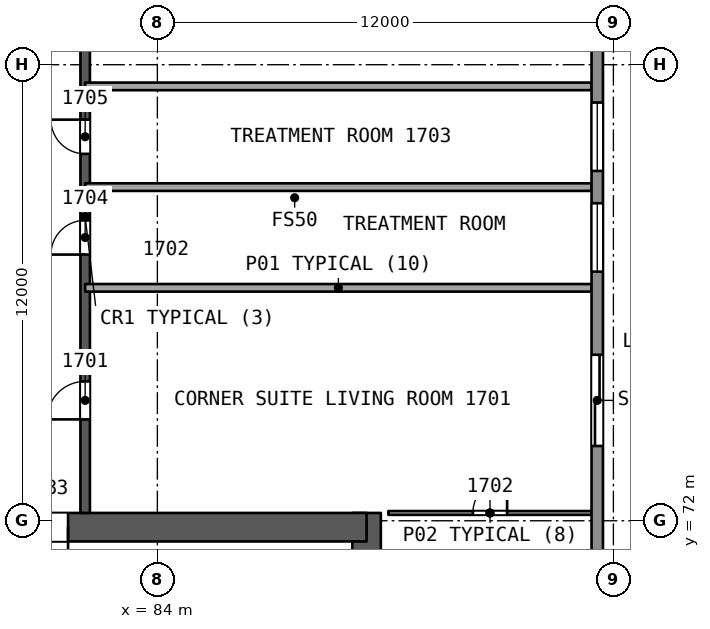
"""IFC4 building model, lengths in metres.
Left out: names, types, materials, properties, quantities, classifications, styles, units other than length and angle.
Written with IfcOpenShell. Run it as: python <this file> out.ifc"""

import sys

from ifc_helpers import new_model, si_unit, direction, frame, frame_2d, origin, place, context, subcontext, project, spatial, rectangle, extrude, element, fill, save


model = new_model("IFC4")
c1 = context("Model", 3, precision=1e-05, world=origin(), true_north=direction((0.0, 1.0)))
c2 = subcontext(c1, "Body", "Model", "MODEL_VIEW")
j1 = project(units=[si_unit("LENGTHUNIT", "METRE"), si_unit("PLANEANGLEUNIT", "RADIAN")], contexts=[c1])
p1 = place(None, origin())
s1 = spatial("IfcSite", under=j1, at=p1, CompositionType="ELEMENT")
p2 = place(p1, origin())
s2 = spatial("IfcBuilding", under=s1, at=p2, CompositionType="ELEMENT")
p3 = place(p2, frame((0.0, 0.0, 75.8)))
s3 = spatial("IfcBuildingStorey", under=s2, at=p3, CompositionType="ELEMENT", Elevation=75.8)
p4 = place(p3, frame((89.505, 58.089, 0.0), z_axis=(0.0, 0.0, 1.0), x_axis=(0.0, 1.0, 0.0)))
e1 = element("IfcWall", 1, at=p4, inside=s3, PredefinedType="SHEAR", context=c2, shape_type="SweptSolid", body=[
    extrude(rectangle(XDim=14.117, YDim=0.75, at=frame_2d((7.059, 0.0))), origin(), (0.0, 0.0, 1.0), 3.7),
])
p5 = place(p3, frame((89.505, 71.831, 0.0), z_axis=(0.0, 0.0, 1.0), x_axis=(-1.0, 0.0, 0.0)))
e2 = element("IfcWall", 2, at=p5, inside=s3, PredefinedType="SHEAR", context=c2, shape_type="SweptSolid", body=[
    extrude(rectangle(XDim=10.005, YDim=0.75, at=frame_2d((5.002, 0.0))), origin(), (0.0, 0.0, 1.0), 3.7),
])
p6 = place(p5, frame((7.855, 0.0, 0.0)))
e3 = element("IfcOpeningElement", 3, at=p6, cuts=e2, PredefinedType="OPENING", context=c2, shape_type="SweptSolid", body=[
    extrude(rectangle(XDim=1.2, YDim=2.1, at=frame_2d((0.6, 1.05))), frame((0.0, 0.385, 0.0), z_axis=(0.0, -1.0, 0.0), x_axis=(1.0, 0.0, 0.0)), (0.0, 0.0, 1.0), 0.771),
])
p7 = place(p3, frame((82.1, 72.206, 0.0), z_axis=(0.0, 0.0, 1.0), x_axis=(0.0, 1.0, 0.0)))
e4 = element("IfcWall", 4, at=p7, inside=s3, PredefinedType="SHEAR", context=c2, shape_type="SweptSolid", body=[
    extrude(rectangle(XDim=15.588, YDim=0.25, at=frame_2d((7.794, 0.0))), origin(), (0.0, 0.0, 1.0), 3.2),
])
p8 = place(p7, frame((2.462, 0.0, 0.0)))
e5 = element("IfcOpeningElement", 5, at=p8, cuts=e4, PredefinedType="OPENING", context=c2, shape_type="SweptSolid", body=[
    extrude(rectangle(XDim=1.0, YDim=2.1, at=frame_2d((0.5, 1.05))), frame((0.0, 0.135, 0.0), z_axis=(0.0, -1.0, 0.0), x_axis=(1.0, 0.0, 0.0)), (0.0, 0.0, 1.0), 0.271),
])
p9 = place(p7, frame((6.799, 0.0, 0.0)))
e6 = element("IfcOpeningElement", 6, at=p9, cuts=e4, PredefinedType="OPENING", context=c2, shape_type="SweptSolid", body=[
    extrude(rectangle(XDim=0.9, YDim=2.1, at=frame_2d((0.45, 1.05))), frame((0.0, 0.135, 0.0), z_axis=(0.0, -1.0, 0.0), x_axis=(1.0, 0.0, 0.0)), (0.0, 0.0, 1.0), 0.271),
])
p10 = place(p7, frame((9.449, 0.0, 0.0)))
e7 = element("IfcOpeningElement", 7, at=p10, cuts=e4, PredefinedType="OPENING", context=c2, shape_type="SweptSolid", body=[
    extrude(rectangle(XDim=0.9, YDim=2.1, at=frame_2d((0.45, 1.05))), frame((0.0, 0.135, 0.0), z_axis=(0.0, -1.0, 0.0), x_axis=(1.0, 0.0, 0.0)), (0.0, 0.0, 1.0), 0.271),
])
p11 = place(p7, frame((12.906, 0.0, 0.0)))
e8 = element("IfcOpeningElement", 8, at=p11, cuts=e4, PredefinedType="OPENING", context=c2, shape_type="SweptSolid", body=[
    extrude(rectangle(XDim=1.0, YDim=2.1, at=frame_2d((0.5, 1.05))), frame((0.0, 0.135, 0.0), z_axis=(0.0, -1.0, 0.0), x_axis=(1.0, 0.0, 0.0)), (0.0, 0.0, 1.0), 0.271),
])
p12 = place(p3, frame((90.079, 72.206, 0.0), z_axis=(0.0, 0.0, 1.0), x_axis=(1.0, 0.0, 0.0)))
e9 = element("IfcWall", 9, at=p12, inside=s3, PredefinedType="PARTITIONING", context=c2, shape_type="SweptSolid", body=[
    extrude(rectangle(XDim=5.347, YDim=0.1, at=frame_2d((2.674, 0.0))), origin(), (0.0, 0.0, 1.0), 3.2),
])
p13 = place(p12, frame((2.224, 0.0, 0.0)))
e10 = element("IfcOpeningElement", 10, at=p13, cuts=e9, PredefinedType="OPENING", context=c2, shape_type="SweptSolid", body=[
    extrude(rectangle(XDim=0.9, YDim=2.1, at=frame_2d((0.45, 1.05))), frame((0.0, 0.061, 0.0), z_axis=(0.0, -1.0, 0.0), x_axis=(1.0, 0.0, 0.0)), (0.0, 0.0, 1.0), 0.121),
])
for number, where, z_axis, x_axis in (
    (11, (95.426, 78.129, 0.0), (0.0, 0.0, 1.0), (-1.0, 0.0, 0.0)),
    (12, (95.426, 80.78, 0.0), (0.0, 0.0, 1.0), (-1.0, 0.0, 0.0)),
    (13, (95.426, 83.429, 0.0), (0.0, 0.0, 1.0), (-1.0, 0.0, 0.0)),
):
    element("IfcWall", number, at=place(p3, frame(where, z_axis=z_axis, x_axis=x_axis)), inside=s3, PredefinedType="PARTITIONING", context=c2, shape_type="SweptSolid", body=[
        extrude(rectangle(XDim=13.326, YDim=0.2, at=frame_2d((6.663, 0.0))), origin(), (0.0, 0.0, 1.0), 3.2),
    ])
p14 = place(p3, frame((95.575, 109.583, 0.0), z_axis=(0.0, 0.0, 1.0), x_axis=(0.0, -1.0, 0.0)))
e14 = element("IfcWall", 14, at=p14, inside=s3, PredefinedType="SOLIDWALL", context=c2, shape_type="SweptSolid", body=[
    extrude(rectangle(XDim=59.167, YDim=0.3, at=frame_2d((29.583, 0.0))), origin(), (0.0, 0.0, 1.0), 3.2),
])
p15 = place(p14, frame((33.216, 0.0, 0.0)))
e15 = element("IfcOpeningElement", 15, at=p15, cuts=e14, PredefinedType="OPENING", context=c2, shape_type="SweptSolid", body=[
    extrude(rectangle(XDim=2.4, YDim=2.4, at=frame_2d((1.2, 1.2))), frame((0.0, 0.161, 0.0), z_axis=(0.0, -1.0, 0.0), x_axis=(1.0, 0.0, 0.0)), (0.0, 0.0, 1.0), 0.321),
])
p16 = place(p14, frame((45.903, 0.0, 0.0)))
e16 = element("IfcOpeningElement", 16, at=p16, cuts=e14, PredefinedType="OPENING", context=c2, shape_type="SweptSolid", body=[
    extrude(rectangle(XDim=2.4, YDim=2.4, at=frame_2d((1.2, 1.2))), frame((0.0, 0.161, 0.0), z_axis=(0.0, -1.0, 0.0), x_axis=(1.0, 0.0, 0.0)), (0.0, 0.0, 1.0), 0.321),
])
p17 = place(p14, frame((22.771, 0.0, 0.0)))
e17 = element("IfcOpeningElement", 17, at=p17, cuts=e14, PredefinedType="OPENING", context=c2, shape_type="SweptSolid", body=[
    extrude(rectangle(XDim=2.4, YDim=2.4, at=frame_2d((1.2, 1.2))), frame((0.0, 0.161, 0.0), z_axis=(0.0, -1.0, 0.0), x_axis=(1.0, 0.0, 0.0)), (0.0, 0.0, 1.0), 0.321),
])
p18 = place(p14, frame((10.88, 0.0, 0.0)))
e18 = element("IfcOpeningElement", 18, at=p18, cuts=e14, PredefinedType="OPENING", context=c2, shape_type="SweptSolid", body=[
    extrude(rectangle(XDim=2.4, YDim=2.4, at=frame_2d((1.2, 1.2))), frame((0.0, 0.161, 0.0), z_axis=(0.0, -1.0, 0.0), x_axis=(1.0, 0.0, 0.0)), (0.0, 0.0, 1.0), 0.321),
])
p19 = place(p14, frame((29.229, 0.0, 0.9)))
e19 = element("IfcOpeningElement", 19, at=p19, cuts=e14, PredefinedType="OPENING", context=c2, shape_type="SweptSolid", body=[
    extrude(rectangle(XDim=1.8, YDim=1.5, at=frame_2d((0.9, 0.75))), frame((0.0, 0.161, 0.0), z_axis=(0.0, -1.0, 0.0), x_axis=(1.0, 0.0, 0.0)), (0.0, 0.0, 1.0), 0.321),
])
p20 = place(p14, frame((26.579, 0.0, 0.9)))
e20 = element("IfcOpeningElement", 20, at=p20, cuts=e14, PredefinedType="OPENING", context=c2, shape_type="SweptSolid", body=[
    extrude(rectangle(XDim=1.8, YDim=1.5, at=frame_2d((0.9, 0.75))), frame((0.0, 0.161, 0.0), z_axis=(0.0, -1.0, 0.0), x_axis=(1.0, 0.0, 0.0)), (0.0, 0.0, 1.0), 0.321),
])
p21 = place(p3, frame((39.093, 83.027, 0.0), z_axis=(0.0, 0.0, 1.0), x_axis=(0.866024586246, 0.500001416016, 0.0)))
e21 = element("IfcWall", 21, at=p21, inside=s3, PredefinedType="SOLIDWALL", context=c2, shape_type="SweptSolid", body=[
    extrude(rectangle(XDim=59.166, YDim=0.3, at=frame_2d((29.583, 0.0))), origin(), (0.0, 0.0, 1.0), 3.2),
])
p22 = place(p21, frame((27.292, 0.0, 0.0)))
e22 = element("IfcOpeningElement", 22, at=p22, cuts=e21, PredefinedType="OPENING", context=c2, shape_type="SweptSolid", body=[
    extrude(rectangle(XDim=2.4, YDim=2.4, at=frame_2d((1.2, 1.2))), frame((0.0, 0.161, 0.0), z_axis=(0.0, -1.0, 0.0), x_axis=(1.0, 0.0, 0.0)), (0.0, 0.0, 1.0), 0.321),
])
p23 = place(p21, frame((22.615, 0.0, 0.0)))
e23 = element("IfcOpeningElement", 23, at=p23, cuts=e21, PredefinedType="OPENING", context=c2, shape_type="SweptSolid", body=[
    extrude(rectangle(XDim=2.4, YDim=2.4, at=frame_2d((1.2, 1.2))), frame((0.0, 0.161, 0.0), z_axis=(0.0, -1.0, 0.0), x_axis=(1.0, 0.0, 0.0)), (0.0, 0.0, 1.0), 0.321),
])
p24 = place(p21, frame((10.88, 0.0, 0.0)))
e24 = element("IfcOpeningElement", 24, at=p24, cuts=e21, PredefinedType="OPENING", context=c2, shape_type="SweptSolid", body=[
    extrude(rectangle(XDim=2.4, YDim=2.4, at=frame_2d((1.2, 1.2))), frame((0.0, 0.161, 0.0), z_axis=(0.0, -1.0, 0.0), x_axis=(1.0, 0.0, 0.0)), (0.0, 0.0, 1.0), 0.321),
])
p25 = place(p21, frame((43.998, 0.0, 0.0)))
e25 = element("IfcOpeningElement", 25, at=p25, cuts=e21, PredefinedType="OPENING", context=c2, shape_type="SweptSolid", body=[
    extrude(rectangle(XDim=2.4, YDim=2.4, at=frame_2d((1.2, 1.2))), frame((0.0, 0.161, 0.0), z_axis=(0.0, -1.0, 0.0), x_axis=(1.0, 0.0, 0.0)), (0.0, 0.0, 1.0), 0.321),
])
p26 = place(p3, frame((90.332, 47.39, 0.0), z_axis=(0.0, 0.0, 1.0), x_axis=(-0.866024586246, 0.500001416016, 0.0)))
e26 = element("IfcWall", 26, at=p26, inside=s3, PredefinedType="SOLIDWALL", context=c2, shape_type="SweptSolid", body=[
    extrude(rectangle(XDim=59.166, YDim=0.3, at=frame_2d((29.583, 0.0))), origin(), (0.0, 0.0, 1.0), 3.2),
])
p27 = place(p26, frame((28.695, 0.0, 0.0)))
e27 = element("IfcOpeningElement", 27, at=p27, cuts=e26, PredefinedType="OPENING", context=c2, shape_type="SweptSolid", body=[
    extrude(rectangle(XDim=2.4, YDim=2.4, at=frame_2d((1.2, 1.2))), frame((0.0, 0.161, 0.0), z_axis=(0.0, -1.0, 0.0), x_axis=(1.0, 0.0, 0.0)), (0.0, 0.0, 1.0), 0.321),
])
p28 = place(p26, frame((33.372, 0.0, 0.0)))
e28 = element("IfcOpeningElement", 28, at=p28, cuts=e26, PredefinedType="OPENING", context=c2, shape_type="SweptSolid", body=[
    extrude(rectangle(XDim=2.4, YDim=2.4, at=frame_2d((1.2, 1.2))), frame((0.0, 0.161, 0.0), z_axis=(0.0, -1.0, 0.0), x_axis=(1.0, 0.0, 0.0)), (0.0, 0.0, 1.0), 0.321),
])
p29 = place(p26, frame((45.903, 0.0, 0.0)))
e29 = element("IfcOpeningElement", 29, at=p29, cuts=e26, PredefinedType="OPENING", context=c2, shape_type="SweptSolid", body=[
    extrude(rectangle(XDim=2.4, YDim=2.4, at=frame_2d((1.2, 1.2))), frame((0.0, 0.161, 0.0), z_axis=(0.0, -1.0, 0.0), x_axis=(1.0, 0.0, 0.0)), (0.0, 0.0, 1.0), 0.321),
])
p30 = place(p26, frame((12.769, 0.0, 0.0)))
e30 = element("IfcOpeningElement", 30, at=p30, cuts=e26, PredefinedType="OPENING", context=c2, shape_type="SweptSolid", body=[
    extrude(rectangle(XDim=2.4, YDim=2.4, at=frame_2d((1.2, 1.2))), frame((0.0, 0.161, 0.0), z_axis=(0.0, -1.0, 0.0), x_axis=(1.0, 0.0, 0.0)), (0.0, 0.0, 1.0), 0.321),
])
p31 = place(p8, origin())
e31 = element("IfcDoor", 31, at=p31, inside=s3, OperationType="SINGLE_SWING_LEFT", PredefinedType="NOTDEFINED", context=c2, shape_type="SweptSolid", body=[
    extrude(rectangle(XDim=1.0, YDim=2.1, at=frame_2d((0.5, 1.05))), frame((0.0, 0.025, 0.0), z_axis=(0.0, -1.0, 0.0), x_axis=(1.0, 0.0, 0.0)), (0.0, 0.0, 1.0), 0.05),
])
fill(e5, e31)
p32 = place(p13, origin())
e32 = element("IfcDoor", 32, at=p32, inside=s3, OperationType="SINGLE_SWING_RIGHT", PredefinedType="NOTDEFINED", context=c2, shape_type="SweptSolid", body=[
    extrude(rectangle(XDim=0.9, YDim=2.1, at=frame_2d((0.45, 1.05))), frame((0.0, 0.025, 0.0), z_axis=(0.0, -1.0, 0.0), x_axis=(1.0, 0.0, 0.0)), (0.0, 0.0, 1.0), 0.05),
])
fill(e10, e32)
p33 = place(p9, origin())
e33 = element("IfcDoor", 33, at=p33, inside=s3, OperationType="SINGLE_SWING_LEFT", PredefinedType="NOTDEFINED", context=c2, shape_type="SweptSolid", body=[
    extrude(rectangle(XDim=0.9, YDim=2.1, at=frame_2d((0.45, 1.05))), frame((0.0, 0.025, 0.0), z_axis=(0.0, -1.0, 0.0), x_axis=(1.0, 0.0, 0.0)), (0.0, 0.0, 1.0), 0.05),
])
fill(e6, e33)
p34 = place(p10, origin())
e34 = element("IfcDoor", 34, at=p34, inside=s3, OperationType="SINGLE_SWING_RIGHT", PredefinedType="NOTDEFINED", context=c2, shape_type="SweptSolid", body=[
    extrude(rectangle(XDim=0.9, YDim=2.1, at=frame_2d((0.45, 1.05))), frame((0.0, 0.025, 0.0), z_axis=(0.0, -1.0, 0.0), x_axis=(1.0, 0.0, 0.0)), (0.0, 0.0, 1.0), 0.05),
])
fill(e7, e34)
p35 = place(p15, origin())
e35 = element("IfcDoor", 35, at=p35, inside=s3, OperationType="SLIDING_TO_LEFT", PredefinedType="NOTDEFINED", context=c2, shape_type="SweptSolid", body=[
    extrude(rectangle(XDim=2.4, YDim=2.4, at=frame_2d((1.2, 1.2))), frame((0.0, 0.025, 0.0), z_axis=(0.0, -1.0, 0.0), x_axis=(1.0, 0.0, 0.0)), (0.0, 0.0, 1.0), 0.05),
])
fill(e15, e35)
p36 = place(p19, origin())
e36 = element("IfcWindow", 36, at=p36, inside=s3, PartitioningType="SINGLE_PANEL", PredefinedType="WINDOW", context=c2, shape_type="SweptSolid", body=[
    extrude(rectangle(XDim=1.8, YDim=1.5, at=frame_2d((0.9, 0.75))), frame((0.0, 0.03, 0.0), z_axis=(0.0, -1.0, 0.0), x_axis=(1.0, 0.0, 0.0)), (0.0, 0.0, 1.0), 0.06),
])
fill(e19, e36)
p37 = place(p20, origin())
e37 = element("IfcWindow", 37, at=p37, inside=s3, PartitioningType="SINGLE_PANEL", PredefinedType="WINDOW", context=c2, shape_type="SweptSolid", body=[
    extrude(rectangle(XDim=1.8, YDim=1.5, at=frame_2d((0.9, 0.75))), frame((0.0, 0.03, 0.0), z_axis=(0.0, -1.0, 0.0), x_axis=(1.0, 0.0, 0.0)), (0.0, 0.0, 1.0), 0.06),
])
fill(e20, e37)
p38 = place(p6, origin())
e38 = element("IfcDoor", 38, at=p38, inside=s3, OperationType="SINGLE_SWING_LEFT", PredefinedType="NOTDEFINED", context=c2, shape_type="SweptSolid", body=[
    extrude(rectangle(XDim=1.2, YDim=2.1, at=frame_2d((0.6, 1.05))), frame((0.0, 0.025, 0.0), z_axis=(0.0, -1.0, 0.0), x_axis=(1.0, 0.0, 0.0)), (0.0, 0.0, 1.0), 0.05),
])
fill(e3, e38)
save(model, sys.argv[1])
